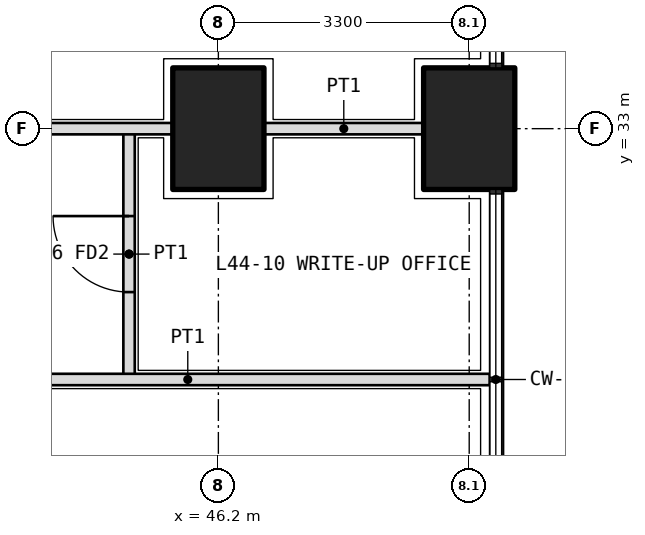
"""IFC4 building model, lengths in metres.
Left out: names, types, materials, properties, quantities, classifications, styles, units other than length and angle.
Written with IfcOpenShell. Run it as: python <this file> out.ifc"""

import sys

from ifc_helpers import new_model, si_unit, direction, frame, frame_2d, origin, origin_2d, place, context, subcontext, project, spatial, rectangle, extrude, element, fill, save


model = new_model("IFC4")
c1 = context("Model", 3, precision=1e-05, world=origin(), true_north=direction((0.0, 1.0)))
c2 = subcontext(c1, "Body", "Model", "MODEL_VIEW")
j1 = project(units=[si_unit("LENGTHUNIT", "METRE"), si_unit("PLANEANGLEUNIT", "RADIAN")], contexts=[c1])
p1 = place(None, origin())
s1 = spatial("IfcSite", under=j1, at=p1, CompositionType="ELEMENT")
p2 = place(p1, origin())
s2 = spatial("IfcBuilding", under=s1, at=p2, CompositionType="ELEMENT")
p3 = place(p2, frame((0.0, 0.0, 193.5)))
s3 = spatial("IfcBuildingStorey", under=s2, at=p3, CompositionType="ELEMENT", Elevation=193.5)
for number, where, z_axis, x_axis in (
    (1, (49.5, 33.0, 0.0), (0.0, 0.0, 1.0), (0.0, 1.0, 0.0)),
    (2, (46.2, 33.0, 0.0), (0.0, 0.0, 1.0), (0.0, 1.0, 0.0)),
):
    element("IfcColumn", number, at=place(p3, frame(where, z_axis=z_axis, x_axis=x_axis)), inside=s3, PredefinedType="COLUMN", context=c2, shape_type="SweptSolid", body=[
        extrude(rectangle(XDim=1.6, YDim=1.2, at=origin_2d()), origin(), (0.0, 0.0, 1.0), 4.2),
    ])
p4 = place(p3, frame((45.025, 29.7, 0.0), z_axis=(0.0, 0.0, 1.0), x_axis=(0.0, 1.0, 0.0)))
e3 = element("IfcWall", 3, at=p4, inside=s3, PredefinedType="PARTITIONING", context=c2, shape_type="SweptSolid", body=[
    extrude(rectangle(XDim=3.3, YDim=0.15, at=frame_2d((1.65, 0.0))), origin(), (0.0, 0.0, 1.0), 2.85),
])
p5 = place(p4, frame((1.15, 0.0, 0.0)))
e4 = element("IfcOpeningElement", 4, at=p5, cuts=e3, PredefinedType="OPENING", context=c2, shape_type="SweptSolid", body=[
    extrude(rectangle(XDim=1.0, YDim=2.1, at=frame_2d((0.5, 1.05))), frame((0.0, 0.085, 0.0), z_axis=(0.0, -1.0, 0.0), x_axis=(1.0, 0.0, 0.0)), (0.0, 0.0, 1.0), 0.17),
])
p6 = place(p3, frame((49.77, 29.7, 0.0), z_axis=(0.0, 0.0, 1.0), x_axis=(-1.0, 0.0, 0.0)))
e5 = element("IfcWall", 5, at=p6, inside=s3, PredefinedType="PARTITIONING", context=c2, shape_type="SweptSolid", body=[
    extrude(rectangle(XDim=7.945, YDim=0.15, at=frame_2d((3.973, 0.0))), origin(), (0.0, 0.0, 1.0), 2.7),
])
p7 = place(p3, frame((48.9, 33.0, 0.0), z_axis=(0.0, 0.0, 1.0), x_axis=(-1.0, 0.0, 0.0)))
e6 = element("IfcWall", 6, at=p7, inside=s3, PredefinedType="PARTITIONING", context=c2, shape_type="SweptSolid", body=[
    extrude(rectangle(XDim=2.1, YDim=0.15, at=frame_2d((1.05, 0.0))), origin(), (0.0, 0.0, 1.0), 2.85),
])
p8 = place(p3, frame((45.6, 33.0, 0.0), z_axis=(0.0, 0.0, 1.0), x_axis=(-1.0, 0.0, 0.0)))
e7 = element("IfcWall", 7, at=p8, inside=s3, PredefinedType="PARTITIONING", context=c2, shape_type="SweptSolid", body=[
    extrude(rectangle(XDim=3.775, YDim=0.15, at=frame_2d((1.888, 0.0))), origin(), (0.0, 0.0, 1.0), 2.85),
])
p9 = place(p5, origin())
e8 = element("IfcDoor", 8, at=p9, inside=s3, OperationType="SINGLE_SWING_RIGHT", PredefinedType="DOOR", context=c2, shape_type="SweptSolid", body=[
    extrude(rectangle(XDim=1.0, YDim=2.1, at=frame_2d((0.5, 1.05))), frame((0.0, 0.025, 0.0), z_axis=(0.0, -1.0, 0.0), x_axis=(1.0, 0.0, 0.0)), (0.0, 0.0, 1.0), 0.05),
])
fill(e4, e8)
save(model, sys.argv[1])
